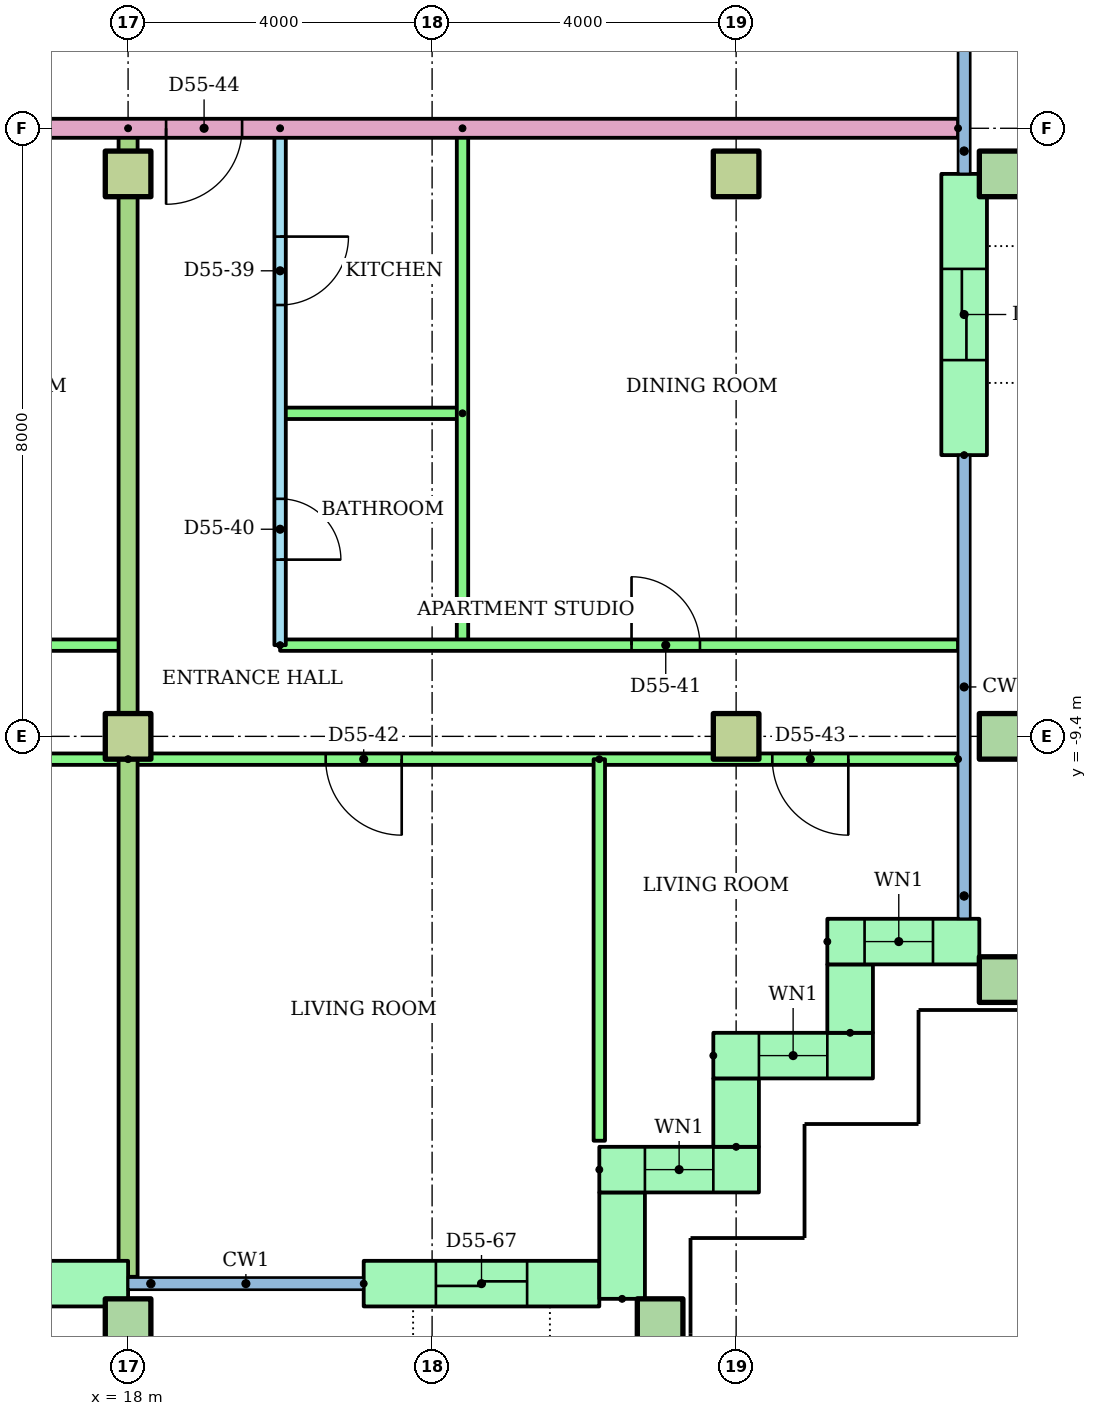
"""IFC4 building model, lengths in metres.
Left out: names, types, materials, properties, quantities, classifications, styles, units other than length and angle.
Written with IfcOpenShell. Run it as: python <this file> out.ifc"""

import sys

from ifc_helpers import new_model, si_unit, direction, frame, frame_2d, origin, origin_2d, place, context, subcontext, project, spatial, rectangle, hollow_rectangle, extrude, element, fill, save


model = new_model("IFC4")
c1 = context("Model", 3, precision=1e-05, world=origin(), true_north=direction((0.0, 1.0)))
c2 = subcontext(c1, "Body", "Model", "MODEL_VIEW")
j1 = project(units=[si_unit("LENGTHUNIT", "METRE"), si_unit("PLANEANGLEUNIT", "RADIAN")], contexts=[c1])
p1 = place(None, origin())
s1 = spatial("IfcSite", under=j1, at=p1, CompositionType="ELEMENT")
p2 = place(p1, origin())
s2 = spatial("IfcBuilding", under=s1, at=p2, CompositionType="ELEMENT")
p3 = place(p2, frame((0.0, 0.0, 214.0)))
s3 = spatial("IfcBuildingStorey", under=s2, at=p3, CompositionType="ELEMENT", Elevation=214.0)
for number, where in (
    (1, (18.0, -17.1, 0.0)),
    (2, (25.0, -17.1, 0.0)),
    (3, (29.5, -12.6, 0.0)),
):
    element("IfcColumn", number, at=place(p3, frame(where)), inside=s3, PredefinedType="COLUMN", context=c2, shape_type="SweptSolid", body=[
        extrude(hollow_rectangle(XDim=0.6, YDim=0.6, WallThickness=0.03, at=origin_2d()), origin(), (0.0, 0.0, 1.0), 3.2),
    ])
for number, where in (
    (4, (18.0, -9.4, 0.0)),
    (5, (26.0, -9.4, 0.0)),
):
    element("IfcColumn", number, at=place(p3, frame(where)), inside=s3, PredefinedType="COLUMN", context=c2, shape_type="SweptSolid", body=[
        extrude(rectangle(XDim=0.6, YDim=0.6, at=origin_2d()), origin(), (0.0, 0.0, 1.0), 3.2),
    ])
p4 = place(p3, frame((29.5, -9.4, 0.0)))
e6 = element("IfcColumn", 6, at=p4, inside=s3, PredefinedType="COLUMN", context=c2, shape_type="SweptSolid", body=[
    extrude(hollow_rectangle(XDim=0.6, YDim=0.6, WallThickness=0.03, at=origin_2d()), origin(), (0.0, 0.0, 1.0), 3.2),
])
for number, where in (
    (7, (18.0, -2.0, 0.0)),
    (8, (26.0, -2.0, 0.0)),
):
    element("IfcColumn", number, at=place(p3, frame(where)), inside=s3, PredefinedType="COLUMN", context=c2, shape_type="SweptSolid", body=[
        extrude(rectangle(XDim=0.6, YDim=0.6, at=origin_2d()), origin(), (0.0, 0.0, 1.0), 3.2),
    ])
p5 = place(p3, frame((29.5, -2.0, 0.0)))
e9 = element("IfcColumn", 9, at=p5, inside=s3, PredefinedType="COLUMN", context=c2, shape_type="SweptSolid", body=[
    extrude(hollow_rectangle(XDim=0.6, YDim=0.6, WallThickness=0.03, at=origin_2d()), origin(), (0.0, 0.0, 1.0), 3.2),
])
p6 = place(p3, frame((14.0, -16.6, 0.0)))
e10 = element("IfcWall", 10, at=p6, inside=s3, PredefinedType="STANDARD", context=c2, shape_type="SweptSolid", body=[
    extrude(rectangle(XDim=4.0, YDim=0.6, at=frame_2d((2.0, 0.0))), origin(), (0.0, 0.0, 1.0), 2.92),
])
p7 = place(p6, frame((1.4, 0.0, 0.0)))
e11 = element("IfcOpeningElement", 11, at=p7, cuts=e10, PredefinedType="OPENING", context=c2, shape_type="SweptSolid", body=[
    extrude(rectangle(XDim=1.2, YDim=2.1, at=frame_2d((0.6, 1.05))), frame((0.0, 0.31, 0.0), z_axis=(0.0, -1.0, 0.0), x_axis=(1.0, 0.0, 0.0)), (0.0, 0.0, 1.0), 0.62),
])
p8 = place(p3, frame((21.1, -16.6, 0.0)))
e12 = element("IfcWall", 12, at=p8, inside=s3, PredefinedType="STANDARD", context=c2, shape_type="SweptSolid", body=[
    extrude(rectangle(XDim=3.1, YDim=0.6, at=frame_2d((1.55, 0.0))), origin(), (0.0, 0.0, 1.0), 2.92),
])
p9 = place(p8, frame((0.95, 0.0, 0.0)))
e13 = element("IfcOpeningElement", 13, at=p9, cuts=e12, PredefinedType="OPENING", context=c2, shape_type="SweptSolid", body=[
    extrude(rectangle(XDim=1.2, YDim=2.1, at=frame_2d((0.6, 1.05))), frame((0.0, 0.31, 0.0), z_axis=(0.0, -1.0, 0.0), x_axis=(1.0, 0.0, 0.0)), (0.0, 0.0, 1.0), 0.62),
])
p10 = place(p3, frame((24.5, -16.8, 0.0), z_axis=(0.0, 0.0, 1.0), x_axis=(0.0, 1.0, 0.0)))
e14 = element("IfcWall", 14, at=p10, inside=s3, PredefinedType="STANDARD", context=c2, shape_type="SweptSolid", body=[
    extrude(rectangle(XDim=1.4, YDim=0.6, at=frame_2d((0.7, 0.0))), origin(), (0.0, 0.0, 1.0), 2.92),
])
p11 = place(p3, frame((24.2, -15.1, 0.0)))
e15 = element("IfcWall", 15, at=p11, inside=s3, PredefinedType="STANDARD", context=c2, shape_type="SweptSolid", body=[
    extrude(rectangle(XDim=2.1, YDim=0.6, at=frame_2d((1.05, 0.0))), origin(), (0.0, 0.0, 1.0), 2.92),
])
p12 = place(p11, frame((0.6, 0.0, 0.9)))
e16 = element("IfcOpeningElement", 16, at=p12, cuts=e15, PredefinedType="OPENING", context=c2, shape_type="SweptSolid", body=[
    extrude(rectangle(XDim=0.9, YDim=1.5, at=frame_2d((0.45, 0.75))), frame((0.0, 0.31, 0.0), z_axis=(0.0, -1.0, 0.0), x_axis=(1.0, 0.0, 0.0)), (0.0, 0.0, 1.0), 0.62),
])
p13 = place(p3, frame((26.0, -14.8, 0.0), z_axis=(0.0, 0.0, 1.0), x_axis=(0.0, 1.0, 0.0)))
e17 = element("IfcWall", 17, at=p13, inside=s3, PredefinedType="STANDARD", context=c2, shape_type="SweptSolid", body=[
    extrude(rectangle(XDim=0.9, YDim=0.6, at=frame_2d((0.45, 0.0))), origin(), (0.0, 0.0, 1.0), 2.92),
])
p14 = place(p3, frame((25.7, -13.6, 0.0)))
e18 = element("IfcWall", 18, at=p14, inside=s3, PredefinedType="STANDARD", context=c2, shape_type="SweptSolid", body=[
    extrude(rectangle(XDim=2.1, YDim=0.6, at=frame_2d((1.05, 0.0))), origin(), (0.0, 0.0, 1.0), 2.92),
])
p15 = place(p14, frame((0.6, 0.0, 0.9)))
e19 = element("IfcOpeningElement", 19, at=p15, cuts=e18, PredefinedType="OPENING", context=c2, shape_type="SweptSolid", body=[
    extrude(rectangle(XDim=0.9, YDim=1.5, at=frame_2d((0.45, 0.75))), frame((0.0, 0.31, 0.0), z_axis=(0.0, -1.0, 0.0), x_axis=(1.0, 0.0, 0.0)), (0.0, 0.0, 1.0), 0.62),
])
p16 = place(p3, frame((27.5, -13.3, 0.0), z_axis=(0.0, 0.0, 1.0), x_axis=(0.0, 1.0, 0.0)))
e20 = element("IfcWall", 20, at=p16, inside=s3, PredefinedType="STANDARD", context=c2, shape_type="SweptSolid", body=[
    extrude(rectangle(XDim=0.9, YDim=0.6, at=frame_2d((0.45, 0.0))), origin(), (0.0, 0.0, 1.0), 2.92),
])
p17 = place(p3, frame((27.2, -12.1, 0.0)))
e21 = element("IfcWall", 21, at=p17, inside=s3, PredefinedType="STANDARD", context=c2, shape_type="SweptSolid", body=[
    extrude(rectangle(XDim=2.0, YDim=0.6, at=frame_2d((1.0, 0.0))), origin(), (0.0, 0.0, 1.0), 2.92),
])
p18 = place(p17, frame((0.49, 0.0, 0.9)))
e22 = element("IfcOpeningElement", 22, at=p18, cuts=e21, PredefinedType="OPENING", context=c2, shape_type="SweptSolid", body=[
    extrude(rectangle(XDim=0.9, YDim=1.5, at=frame_2d((0.45, 0.75))), frame((0.0, 0.31, 0.0), z_axis=(0.0, -1.0, 0.0), x_axis=(1.0, 0.0, 0.0)), (0.0, 0.0, 1.0), 0.62),
])
p19 = place(p3, frame((29.0, -5.7, 0.0), z_axis=(0.0, 0.0, 1.0), x_axis=(0.0, 1.0, 0.0)))
e23 = element("IfcWall", 23, at=p19, inside=s3, PredefinedType="STANDARD", context=c2, shape_type="SweptSolid", body=[
    extrude(rectangle(XDim=3.7, YDim=0.6, at=frame_2d((1.85, 0.0))), origin(), (0.0, 0.0, 1.0), 2.92),
])
p20 = place(p19, frame((1.25, 0.0, 0.0)))
e24 = element("IfcOpeningElement", 24, at=p20, cuts=e23, PredefinedType="OPENING", context=c2, shape_type="SweptSolid", body=[
    extrude(rectangle(XDim=1.2, YDim=2.1, at=frame_2d((0.6, 1.05))), frame((0.0, 0.31, 0.0), z_axis=(0.0, -1.0, 0.0), x_axis=(1.0, 0.0, 0.0)), (0.0, 0.0, 1.0), 0.62),
])
p21 = place(p3, frame((12.0, -8.2, 0.0)))
e25 = element("IfcWall", 25, at=p21, inside=s3, PredefinedType="PARTITIONING", context=c2, shape_type="SweptSolid", body=[
    extrude(rectangle(XDim=6.0, YDim=0.15, at=frame_2d((3.0, 0.0))), origin(), (0.0, 0.0, 1.0), 2.4),
])
p22 = place(p21, frame((3.75, 0.0, 0.0)))
e26 = element("IfcOpeningElement", 26, at=p22, cuts=e25, PredefinedType="OPENING", context=c2, shape_type="SweptSolid", body=[
    extrude(rectangle(XDim=0.9, YDim=2.1, at=frame_2d((0.45, 1.05))), frame((0.0, 0.085, 0.0), z_axis=(0.0, -1.0, 0.0), x_axis=(1.0, 0.0, 0.0)), (0.0, 0.0, 1.0), 0.17),
])
p23 = place(p3, frame((18.0, -9.7, 0.0), z_axis=(0.0, 0.0, 1.0), x_axis=(-1.0, 0.0, 0.0)))
e27 = element("IfcWall", 27, at=p23, inside=s3, PredefinedType="PARTITIONING", context=c2, shape_type="SweptSolid", body=[
    extrude(rectangle(XDim=8.0, YDim=0.15, at=frame_2d((4.0, 0.0))), origin(), (0.0, 0.0, 1.0), 2.4),
])
p24 = place(p23, frame((5.5, 0.0, 0.0)))
e28 = element("IfcOpeningElement", 28, at=p24, cuts=e27, PredefinedType="OPENING", context=c2, shape_type="SweptSolid", body=[
    extrude(rectangle(XDim=1.0, YDim=2.1, at=frame_2d((0.5, 1.05))), frame((0.0, 0.085, 0.0), z_axis=(0.0, -1.0, 0.0), x_axis=(1.0, 0.0, 0.0)), (0.0, 0.0, 1.0), 0.17),
])
p25 = place(p23, frame((1.5, 0.0, 0.0)))
e29 = element("IfcOpeningElement", 29, at=p25, cuts=e27, PredefinedType="OPENING", context=c2, shape_type="SweptSolid", body=[
    extrude(rectangle(XDim=1.0, YDim=2.1, at=frame_2d((0.5, 1.05))), frame((0.0, 0.085, 0.0), z_axis=(0.0, -1.0, 0.0), x_axis=(1.0, 0.0, 0.0)), (0.0, 0.0, 1.0), 0.17),
])
p26 = place(p3, frame((20.0, -1.4, 0.0), z_axis=(0.0, 0.0, 1.0), x_axis=(0.0, -1.0, 0.0)))
e30 = element("IfcWall", 30, at=p26, inside=s3, PredefinedType="PARTITIONING", context=c2, shape_type="SweptSolid", body=[
    extrude(rectangle(XDim=6.8, YDim=0.15, at=frame_2d((3.4, 0.0))), origin(), (0.0, 0.0, 1.0), 2.4),
])
p27 = place(p26, frame((1.425, 0.0, 0.0)))
e31 = element("IfcOpeningElement", 31, at=p27, cuts=e30, PredefinedType="OPENING", context=c2, shape_type="SweptSolid", body=[
    extrude(rectangle(XDim=0.9, YDim=2.1, at=frame_2d((0.45, 1.05))), frame((0.0, 0.085, 0.0), z_axis=(0.0, -1.0, 0.0), x_axis=(1.0, 0.0, 0.0)), (0.0, 0.0, 1.0), 0.17),
])
p28 = place(p26, frame((4.875, 0.0, 0.0)))
e32 = element("IfcOpeningElement", 32, at=p28, cuts=e30, PredefinedType="OPENING", context=c2, shape_type="SweptSolid", body=[
    extrude(rectangle(XDim=0.8, YDim=2.1, at=frame_2d((0.4, 1.05))), frame((0.0, 0.085, 0.0), z_axis=(0.0, -1.0, 0.0), x_axis=(1.0, 0.0, 0.0)), (0.0, 0.0, 1.0), 0.17),
])
p29 = place(p3, frame((22.4, -5.15, 0.0), z_axis=(0.0, 0.0, 1.0), x_axis=(-1.0, 0.0, 0.0)))
e33 = element("IfcWall", 33, at=p29, inside=s3, PredefinedType="PARTITIONING", context=c2, shape_type="SweptSolid", body=[
    extrude(rectangle(XDim=2.4, YDim=0.15, at=frame_2d((1.2, 0.0))), origin(), (0.0, 0.0, 1.0), 2.4),
])
p30 = place(p3, frame((22.4, -1.4, 0.0), z_axis=(0.0, 0.0, 1.0), x_axis=(0.0, -1.0, 0.0)))
e34 = element("IfcWall", 34, at=p30, inside=s3, PredefinedType="PARTITIONING", context=c2, shape_type="SweptSolid", body=[
    extrude(rectangle(XDim=6.8, YDim=0.15, at=frame_2d((3.4, 0.0))), origin(), (0.0, 0.0, 1.0), 2.4),
])
p31 = place(p3, frame((20.0, -8.2, 0.0)))
e35 = element("IfcWall", 35, at=p31, inside=s3, PredefinedType="PARTITIONING", context=c2, shape_type="SweptSolid", body=[
    extrude(rectangle(XDim=8.92, YDim=0.15, at=frame_2d((4.46, 0.0))), origin(), (0.0, 0.0, 1.0), 2.4),
])
p32 = place(p31, frame((4.624, 0.0, 0.0)))
e36 = element("IfcOpeningElement", 36, at=p32, cuts=e35, PredefinedType="OPENING", context=c2, shape_type="SweptSolid", body=[
    extrude(rectangle(XDim=0.9, YDim=2.1, at=frame_2d((0.45, 1.05))), frame((0.0, 0.085, 0.0), z_axis=(0.0, -1.0, 0.0), x_axis=(1.0, 0.0, 0.0)), (0.0, 0.0, 1.0), 0.17),
])
p33 = place(p3, frame((28.92, -9.7, 0.0), z_axis=(0.0, 0.0, 1.0), x_axis=(-1.0, 0.0, 0.0)))
e37 = element("IfcWall", 37, at=p33, inside=s3, PredefinedType="PARTITIONING", context=c2, shape_type="SweptSolid", body=[
    extrude(rectangle(XDim=10.92, YDim=0.15, at=frame_2d((5.46, 0.0))), origin(), (0.0, 0.0, 1.0), 2.4),
])
p34 = place(p33, frame((7.32, 0.0, 0.0)))
e38 = element("IfcOpeningElement", 38, at=p34, cuts=e37, PredefinedType="OPENING", context=c2, shape_type="SweptSolid", body=[
    extrude(rectangle(XDim=1.0, YDim=2.1, at=frame_2d((0.5, 1.05))), frame((0.0, 0.085, 0.0), z_axis=(0.0, -1.0, 0.0), x_axis=(1.0, 0.0, 0.0)), (0.0, 0.0, 1.0), 0.17),
])
p35 = place(p33, frame((1.444, 0.0, 0.0)))
e39 = element("IfcOpeningElement", 39, at=p35, cuts=e37, PredefinedType="OPENING", context=c2, shape_type="SweptSolid", body=[
    extrude(rectangle(XDim=1.0, YDim=2.1, at=frame_2d((0.5, 1.05))), frame((0.0, 0.085, 0.0), z_axis=(0.0, -1.0, 0.0), x_axis=(1.0, 0.0, 0.0)), (0.0, 0.0, 1.0), 0.17),
])
p36 = place(p3, frame((24.2, -9.7, 0.0), z_axis=(0.0, 0.0, 1.0), x_axis=(0.0, -1.0, 0.0)))
e40 = element("IfcWall", 40, at=p36, inside=s3, PredefinedType="PARTITIONING", context=c2, shape_type="SweptSolid", body=[
    extrude(rectangle(XDim=5.02, YDim=0.15, at=frame_2d((2.51, 0.0))), origin(), (0.0, 0.0, 1.0), 2.4),
])
p37 = place(p3, frame((18.0, -1.4, 0.0), z_axis=(0.0, 0.0, 1.0), x_axis=(0.0, -1.0, 0.0)))
e41 = element("IfcWall", 41, at=p37, inside=s3, PredefinedType="PARTITIONING", context=c2, shape_type="SweptSolid", body=[
    extrude(rectangle(XDim=15.11, YDim=0.25, at=frame_2d((7.555, 0.0))), origin(), (0.0, 0.0, 1.0), 2.4),
])
p38 = place(p3, frame((28.92, -1.4, 0.0), z_axis=(0.0, 0.0, 1.0), x_axis=(-1.0, 0.0, 0.0)))
e42 = element("IfcWall", 42, at=p38, inside=s3, PredefinedType="PARTITIONING", context=c2, shape_type="SweptSolid", body=[
    extrude(rectangle(XDim=14.92, YDim=0.25, at=frame_2d((7.46, 0.0))), origin(), (0.0, 0.0, 1.0), 2.4),
])
p39 = place(p38, frame((9.42, 0.0, 0.0)))
e43 = element("IfcOpeningElement", 43, at=p39, cuts=e42, PredefinedType="OPENING", context=c2, shape_type="SweptSolid", body=[
    extrude(rectangle(XDim=1.0, YDim=2.1, at=frame_2d((0.5, 1.05))), frame((0.0, 0.135, 0.0), z_axis=(0.0, -1.0, 0.0), x_axis=(1.0, 0.0, 0.0)), (0.0, 0.0, 1.0), 0.27),
])
p40 = place(p12, origin())
e44 = element("IfcWindow", 44, at=p40, inside=s3, PartitioningType="SINGLE_PANEL", PredefinedType="WINDOW", context=c2, shape_type="SweptSolid", body=[
    extrude(rectangle(XDim=0.9, YDim=1.5, at=frame_2d((0.45, 0.75))), frame((0.0, 0.03, 0.0), z_axis=(0.0, -1.0, 0.0), x_axis=(1.0, 0.0, 0.0)), (0.0, 0.0, 1.0), 0.06),
])
fill(e16, e44)
p41 = place(p15, origin())
e45 = element("IfcWindow", 45, at=p41, inside=s3, PartitioningType="SINGLE_PANEL", PredefinedType="WINDOW", context=c2, shape_type="SweptSolid", body=[
    extrude(rectangle(XDim=0.9, YDim=1.5, at=frame_2d((0.45, 0.75))), frame((0.0, 0.03, 0.0), z_axis=(0.0, -1.0, 0.0), x_axis=(1.0, 0.0, 0.0)), (0.0, 0.0, 1.0), 0.06),
])
fill(e19, e45)
p42 = place(p18, origin())
e46 = element("IfcWindow", 46, at=p42, inside=s3, PartitioningType="SINGLE_PANEL", PredefinedType="WINDOW", context=c2, shape_type="SweptSolid", body=[
    extrude(rectangle(XDim=0.9, YDim=1.5, at=frame_2d((0.45, 0.75))), frame((0.0, 0.03, 0.0), z_axis=(0.0, -1.0, 0.0), x_axis=(1.0, 0.0, 0.0)), (0.0, 0.0, 1.0), 0.06),
])
fill(e22, e46)
p43 = place(p27, origin())
e47 = element("IfcDoor", 47, at=p43, inside=s3, OperationType="SINGLE_SWING_LEFT", PredefinedType="DOOR", context=c2, shape_type="SweptSolid", body=[
    extrude(rectangle(XDim=0.9, YDim=2.1, at=frame_2d((0.45, 1.05))), frame((0.0, 0.025, 0.0), z_axis=(0.0, -1.0, 0.0), x_axis=(1.0, 0.0, 0.0)), (0.0, 0.0, 1.0), 0.05),
])
fill(e31, e47)
p44 = place(p28, origin())
e48 = element("IfcDoor", 48, at=p44, inside=s3, OperationType="SINGLE_SWING_RIGHT", PredefinedType="DOOR", context=c2, shape_type="SweptSolid", body=[
    extrude(rectangle(XDim=0.8, YDim=2.1, at=frame_2d((0.4, 1.05))), frame((0.0, 0.025, 0.0), z_axis=(0.0, -1.0, 0.0), x_axis=(1.0, 0.0, 0.0)), (0.0, 0.0, 1.0), 0.05),
])
fill(e32, e48)
p45 = place(p32, origin())
e49 = element("IfcDoor", 49, at=p45, inside=s3, OperationType="SINGLE_SWING_LEFT", PredefinedType="DOOR", context=c2, shape_type="SweptSolid", body=[
    extrude(rectangle(XDim=0.9, YDim=2.1, at=frame_2d((0.45, 1.05))), frame((0.0, 0.025, 0.0), z_axis=(0.0, -1.0, 0.0), x_axis=(1.0, 0.0, 0.0)), (0.0, 0.0, 1.0), 0.05),
])
fill(e36, e49)
p46 = place(p34, origin())
e50 = element("IfcDoor", 50, at=p46, inside=s3, OperationType="SINGLE_SWING_LEFT", PredefinedType="DOOR", context=c2, shape_type="SweptSolid", body=[
    extrude(rectangle(XDim=1.0, YDim=2.1, at=frame_2d((0.5, 1.05))), frame((0.0, 0.025, 0.0), z_axis=(0.0, -1.0, 0.0), x_axis=(1.0, 0.0, 0.0)), (0.0, 0.0, 1.0), 0.05),
])
fill(e38, e50)
p47 = place(p35, origin())
e51 = element("IfcDoor", 51, at=p47, inside=s3, OperationType="SINGLE_SWING_LEFT", PredefinedType="DOOR", context=c2, shape_type="SweptSolid", body=[
    extrude(rectangle(XDim=1.0, YDim=2.1, at=frame_2d((0.5, 1.05))), frame((0.0, 0.025, 0.0), z_axis=(0.0, -1.0, 0.0), x_axis=(1.0, 0.0, 0.0)), (0.0, 0.0, 1.0), 0.05),
])
fill(e39, e51)
p48 = place(p39, origin())
e52 = element("IfcDoor", 52, at=p48, inside=s3, OperationType="SINGLE_SWING_RIGHT", PredefinedType="DOOR", context=c2, shape_type="SweptSolid", body=[
    extrude(rectangle(XDim=1.0, YDim=2.1, at=frame_2d((0.5, 1.05))), frame((0.0, 0.025, 0.0), z_axis=(0.0, -1.0, 0.0), x_axis=(1.0, 0.0, 0.0)), (0.0, 0.0, 1.0), 0.05),
])
fill(e43, e52)
p49 = place(p9, origin())
e53 = element("IfcDoor", 53, at=p49, inside=s3, OperationType="SLIDING_TO_LEFT", PredefinedType="DOOR", context=c2, shape_type="SweptSolid", body=[
    extrude(rectangle(XDim=1.2, YDim=2.1, at=frame_2d((0.6, 1.05))), frame((0.0, 0.025, 0.0), z_axis=(0.0, -1.0, 0.0), x_axis=(1.0, 0.0, 0.0)), (0.0, 0.0, 1.0), 0.05),
])
fill(e13, e53)
p50 = place(p20, origin())
e54 = element("IfcDoor", 54, at=p50, inside=s3, OperationType="SLIDING_TO_LEFT", PredefinedType="DOOR", context=c2, shape_type="SweptSolid", body=[
    extrude(rectangle(XDim=1.2, YDim=2.1, at=frame_2d((0.6, 1.05))), frame((0.0, 0.025, 0.0), z_axis=(0.0, -1.0, 0.0), x_axis=(1.0, 0.0, 0.0)), (0.0, 0.0, 1.0), 0.05),
])
fill(e24, e54)
save(model, sys.argv[1])
